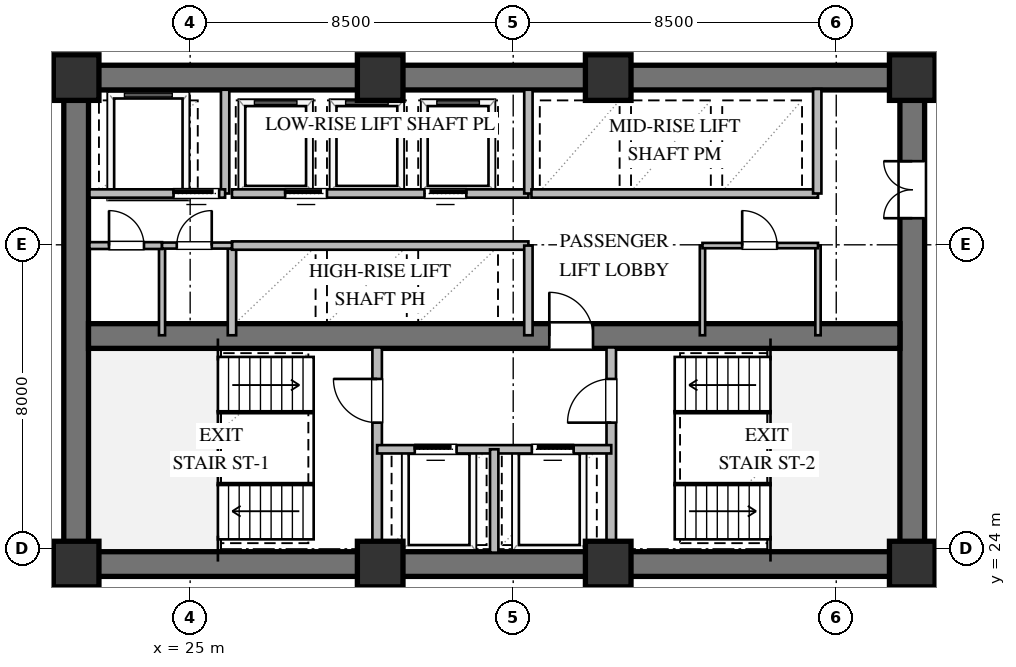
"""IFC4 building model, lengths in metres.
Left out: names, types, materials, properties, quantities, classifications, styles, units other than length and angle.
Written with IfcOpenShell. Run it as: python <this file> out.ifc"""

import sys

from ifc_helpers import new_model, si_unit, direction, frame, frame_2d, origin, origin_2d, place, context, subcontext, project, spatial, rectangle, extrude, element, fill, save


model = new_model("IFC4")
c1 = context("Model", 3, precision=1e-05, world=origin(), true_north=direction((0.0, 1.0)))
c2 = subcontext(c1, "Body", "Model", "MODEL_VIEW")
j1 = project(units=[si_unit("LENGTHUNIT", "METRE"), si_unit("PLANEANGLEUNIT", "RADIAN")], contexts=[c1])
p1 = place(None, origin())
s1 = spatial("IfcSite", under=j1, at=p1, CompositionType="ELEMENT")
p2 = place(p1, origin())
s2 = spatial("IfcBuilding", under=s1, at=p2, CompositionType="ELEMENT")
p3 = place(p2, frame((0.0, 0.0, 81.6)))
s3 = spatial("IfcBuildingStorey", under=s2, at=p3, CompositionType="ELEMENT", Elevation=81.6)
for number, where, z_axis, x_axis in (
    (1, (21.675, 23.6, 0.0), (0.0, 0.0, 1.0), (1.0, 0.0, 0.0)),
    (2, (21.675, 36.4, 0.0), (0.0, 0.0, 1.0), (1.0, 0.0, 0.0)),
):
    element("IfcWall", number, at=place(p3, frame(where, z_axis=z_axis, x_axis=x_axis)), inside=s3, PredefinedType="SHEAR", context=c2, shape_type="SweptSolid", body=[
        extrude(rectangle(XDim=22.65, YDim=0.65, at=frame_2d((11.325, 0.0))), origin(), (0.0, 0.0, 1.0), 3.36),
    ])
p4 = place(p3, frame((22.0, 23.925, 0.0), z_axis=(0.0, 0.0, 1.0), x_axis=(0.0, 1.0, 0.0)))
e3 = element("IfcWall", 3, at=p4, inside=s3, PredefinedType="SHEAR", context=c2, shape_type="SweptSolid", body=[
    extrude(rectangle(XDim=12.15, YDim=0.65, at=frame_2d((6.075, 0.0))), origin(), (0.0, 0.0, 1.0), 3.36),
])
p5 = place(p3, frame((44.0, 23.925, 0.0), z_axis=(0.0, 0.0, 1.0), x_axis=(0.0, 1.0, 0.0)))
e4 = element("IfcWall", 4, at=p5, inside=s3, PredefinedType="SHEAR", context=c2, shape_type="SweptSolid", body=[
    extrude(rectangle(XDim=12.15, YDim=0.65, at=frame_2d((6.075, 0.0))), origin(), (0.0, 0.0, 1.0), 3.36),
])
p6 = place(p5, frame((8.775, 0.0, 0.0)))
e5 = element("IfcOpeningElement", 5, at=p6, cuts=e4, PredefinedType="OPENING", context=c2, shape_type="SweptSolid", body=[
    extrude(rectangle(XDim=1.5, YDim=2.15, at=frame_2d((0.75, 1.075))), frame((0.0, 0.335, 0.0), z_axis=(0.0, -1.0, 0.0), x_axis=(1.0, 0.0, 0.0)), (0.0, 0.0, 1.0), 0.67),
])
p7 = place(p3, frame((22.325, 29.6, 0.0), z_axis=(0.0, 0.0, 1.0), x_axis=(1.0, 0.0, 0.0)))
e6 = element("IfcWall", 6, at=p7, inside=s3, PredefinedType="SHEAR", context=c2, shape_type="SweptSolid", body=[
    extrude(rectangle(XDim=21.35, YDim=0.65, at=frame_2d((10.675, 0.0))), origin(), (0.0, 0.0, 1.0), 3.36),
])
p8 = place(p7, frame((12.125, 0.0, 0.0)))
e7 = element("IfcOpeningElement", 7, at=p8, cuts=e6, PredefinedType="OPENING", context=c2, shape_type="SweptSolid", body=[
    extrude(rectangle(XDim=1.15, YDim=2.1, at=frame_2d((0.575, 1.05))), frame((0.0, 0.335, 0.0), z_axis=(0.0, -1.0, 0.0), x_axis=(1.0, 0.0, 0.0)), (0.0, 0.0, 1.0), 0.67),
])
for number, where, z_axis, x_axis in (
    (8, (22.0, 23.6, 0.0), (0.0, 0.0, 1.0), (1.0, 0.0, 0.0)),
    (9, (30.0, 23.6, 0.0), (0.0, 0.0, 1.0), (1.0, 0.0, 0.0)),
    (10, (36.0, 23.6, 0.0), (0.0, 0.0, 1.0), (1.0, 0.0, 0.0)),
    (11, (44.0, 23.6, 0.0), (0.0, 0.0, 1.0), (1.0, 0.0, 0.0)),
    (12, (44.0, 36.4, 0.0), (0.0, 0.0, 1.0), (1.0, 0.0, 0.0)),
    (13, (36.0, 36.4, 0.0), (0.0, 0.0, 1.0), (1.0, 0.0, 0.0)),
    (14, (30.0, 36.4, 0.0), (0.0, 0.0, 1.0), (1.0, 0.0, 0.0)),
    (15, (22.0, 36.4, 0.0), (0.0, 0.0, 1.0), (1.0, 0.0, 0.0)),
):
    element("IfcColumn", number, at=place(p3, frame(where, z_axis=z_axis, x_axis=x_axis)), inside=s3, PredefinedType="COLUMN", context=c2, shape_type="SweptSolid", body=[
        extrude(rectangle(XDim=1.2, YDim=1.2, at=origin_2d()), origin(), (0.0, 0.0, 1.0), 3.6),
    ])
p9 = place(p3, frame((29.92, 23.9, 0.0), z_axis=(0.0, 0.0, 1.0), x_axis=(0.0, 1.0, 0.0)))
e16 = element("IfcWall", 16, at=p9, inside=s3, PredefinedType="SOLIDWALL", context=c2, shape_type="SweptSolid", body=[
    extrude(rectangle(XDim=5.4, YDim=0.25, at=frame_2d((2.7, 0.0))), origin(), (0.0, 0.0, 1.0), 3.36),
])
p10 = place(p9, frame((3.421, 0.0, 0.0)))
e17 = element("IfcOpeningElement", 17, at=p10, cuts=e16, PredefinedType="OPENING", context=c2, shape_type="SweptSolid", body=[
    extrude(rectangle(XDim=1.15, YDim=2.1, at=frame_2d((0.575, 1.05))), frame((0.0, 0.135, 0.0), z_axis=(0.0, -1.0, 0.0), x_axis=(1.0, 0.0, 0.0)), (0.0, 0.0, 1.0), 0.27),
])
p11 = place(p3, frame((36.08, 23.9, 0.0), z_axis=(0.0, 0.0, 1.0), x_axis=(0.0, 1.0, 0.0)))
e18 = element("IfcWall", 18, at=p11, inside=s3, PredefinedType="SOLIDWALL", context=c2, shape_type="SweptSolid", body=[
    extrude(rectangle(XDim=5.4, YDim=0.25, at=frame_2d((2.7, 0.0))), origin(), (0.0, 0.0, 1.0), 3.36),
])
p12 = place(p11, frame((3.421, 0.0, 0.0)))
e19 = element("IfcOpeningElement", 19, at=p12, cuts=e18, PredefinedType="OPENING", context=c2, shape_type="SweptSolid", body=[
    extrude(rectangle(XDim=1.15, YDim=2.1, at=frame_2d((0.575, 1.05))), frame((0.0, 0.135, 0.0), z_axis=(0.0, -1.0, 0.0), x_axis=(1.0, 0.0, 0.0)), (0.0, 0.0, 1.0), 0.27),
])
p13 = place(p3, frame((29.92, 26.62, 0.0), z_axis=(0.0, 0.0, 1.0), x_axis=(1.0, 0.0, 0.0)))
e20 = element("IfcWall", 20, at=p13, inside=s3, PredefinedType="SOLIDWALL", context=c2, shape_type="SweptSolid", body=[
    extrude(rectangle(XDim=6.16, YDim=0.22, at=frame_2d((3.08, 0.0))), origin(), (0.0, 0.0, 1.0), 3.36),
])
p14 = place(p13, frame((0.99, 0.0, 0.0)))
e21 = element("IfcOpeningElement", 21, at=p14, cuts=e20, PredefinedType="OPENING", context=c2, shape_type="SweptSolid", body=[
    extrude(rectangle(XDim=1.1, YDim=2.1, at=frame_2d((0.55, 1.05))), frame((0.0, 0.12, 0.0), z_axis=(0.0, -1.0, 0.0), x_axis=(1.0, 0.0, 0.0)), (0.0, 0.0, 1.0), 0.24),
])
p15 = place(p13, frame((4.07, 0.0, 0.0)))
e22 = element("IfcOpeningElement", 22, at=p15, cuts=e20, PredefinedType="OPENING", context=c2, shape_type="SweptSolid", body=[
    extrude(rectangle(XDim=1.1, YDim=2.1, at=frame_2d((0.55, 1.05))), frame((0.0, 0.12, 0.0), z_axis=(0.0, -1.0, 0.0), x_axis=(1.0, 0.0, 0.0)), (0.0, 0.0, 1.0), 0.24),
])
p16 = place(p3, frame((33.0, 23.9, 0.0), z_axis=(0.0, 0.0, 1.0), x_axis=(0.0, 1.0, 0.0)))
e23 = element("IfcWall", 23, at=p16, inside=s3, PredefinedType="SOLIDWALL", context=c2, shape_type="SweptSolid", body=[
    extrude(rectangle(XDim=2.72, YDim=0.22, at=frame_2d((1.36, 0.0))), origin(), (0.0, 0.0, 1.0), 3.36),
])
p17 = place(p3, frame((25.92, 33.35, 0.0), z_axis=(0.0, 0.0, 1.0), x_axis=(0.0, 1.0, 0.0)))
e24 = element("IfcWall", 24, at=p17, inside=s3, PredefinedType="SOLIDWALL", context=c2, shape_type="SweptSolid", body=[
    extrude(rectangle(XDim=2.73, YDim=0.22, at=frame_2d((1.365, 0.0))), origin(), (0.0, 0.0, 1.0), 3.36),
])
p18 = place(p3, frame((22.35, 33.35, 0.0), z_axis=(0.0, 0.0, 1.0), x_axis=(1.0, 0.0, 0.0)))
e25 = element("IfcWall", 25, at=p18, inside=s3, PredefinedType="SOLIDWALL", context=c2, shape_type="SweptSolid", body=[
    extrude(rectangle(XDim=3.57, YDim=0.22, at=frame_2d((1.785, 0.0))), origin(), (0.0, 0.0, 1.0), 3.36),
])
p19 = place(p18, frame((2.213, 0.0, 0.0)))
e26 = element("IfcOpeningElement", 26, at=p19, cuts=e25, PredefinedType="OPENING", context=c2, shape_type="SweptSolid", body=[
    extrude(rectangle(XDim=1.2, YDim=2.1, at=frame_2d((0.6, 1.05))), frame((0.0, 0.12, 0.0), z_axis=(0.0, -1.0, 0.0), x_axis=(1.0, 0.0, 0.0)), (0.0, 0.0, 1.0), 0.24),
])
p20 = place(p3, frame((26.1, 29.62, 0.0), z_axis=(0.0, 0.0, 1.0), x_axis=(0.0, 1.0, 0.0)))
e27 = element("IfcWall", 27, at=p20, inside=s3, PredefinedType="SOLIDWALL", context=c2, shape_type="SweptSolid", body=[
    extrude(rectangle(XDim=2.36, YDim=0.22, at=frame_2d((1.18, 0.0))), origin(), (0.0, 0.0, 1.0), 3.36),
])
p21 = place(p3, frame((26.1, 31.98, 0.0), z_axis=(0.0, 0.0, 1.0), x_axis=(1.0, 0.0, 0.0)))
e28 = element("IfcWall", 28, at=p21, inside=s3, PredefinedType="SOLIDWALL", context=c2, shape_type="SweptSolid", body=[
    extrude(rectangle(XDim=7.8, YDim=0.22, at=frame_2d((3.9, 0.0))), origin(), (0.0, 0.0, 1.0), 3.36),
])
p22 = place(p3, frame((33.9, 29.62, 0.0), z_axis=(0.0, 0.0, 1.0), x_axis=(0.0, 1.0, 0.0)))
e29 = element("IfcWall", 29, at=p22, inside=s3, PredefinedType="SOLIDWALL", context=c2, shape_type="SweptSolid", body=[
    extrude(rectangle(XDim=2.36, YDim=0.22, at=frame_2d((1.18, 0.0))), origin(), (0.0, 0.0, 1.0), 3.36),
])
p23 = place(p3, frame((26.1, 33.35, 0.0), z_axis=(0.0, 0.0, 1.0), x_axis=(1.0, 0.0, 0.0)))
e30 = element("IfcWall", 30, at=p23, inside=s3, PredefinedType="SOLIDWALL", context=c2, shape_type="SweptSolid", body=[
    extrude(rectangle(XDim=7.8, YDim=0.22, at=frame_2d((3.9, 0.0))), origin(), (0.0, 0.0, 1.0), 3.36),
])
p24 = place(p23, frame((1.4, 0.0, 0.0)))
e31 = element("IfcOpeningElement", 31, at=p24, cuts=e30, PredefinedType="OPENING", context=c2, shape_type="SweptSolid", body=[
    extrude(rectangle(XDim=1.1, YDim=2.1, at=frame_2d((0.55, 1.05))), frame((0.0, 0.12, 0.0), z_axis=(0.0, -1.0, 0.0), x_axis=(1.0, 0.0, 0.0)), (0.0, 0.0, 1.0), 0.24),
])
p25 = place(p23, frame((5.066, 0.0, 0.0)))
e32 = element("IfcOpeningElement", 32, at=p25, cuts=e30, PredefinedType="OPENING", context=c2, shape_type="SweptSolid", body=[
    extrude(rectangle(XDim=1.1, YDim=2.1, at=frame_2d((0.55, 1.05))), frame((0.0, 0.12, 0.0), z_axis=(0.0, -1.0, 0.0), x_axis=(1.0, 0.0, 0.0)), (0.0, 0.0, 1.0), 0.24),
])
p26 = place(p3, frame((33.9, 33.35, 0.0), z_axis=(0.0, 0.0, 1.0), x_axis=(0.0, 1.0, 0.0)))
e33 = element("IfcWall", 33, at=p26, inside=s3, PredefinedType="SOLIDWALL", context=c2, shape_type="SweptSolid", body=[
    extrude(rectangle(XDim=2.73, YDim=0.22, at=frame_2d((1.365, 0.0))), origin(), (0.0, 0.0, 1.0), 3.36),
])
p27 = place(p3, frame((33.98, 33.35, 0.0), z_axis=(0.0, 0.0, 1.0), x_axis=(1.0, 0.0, 0.0)))
e34 = element("IfcWall", 34, at=p27, inside=s3, PredefinedType="SOLIDWALL", context=c2, shape_type="SweptSolid", body=[
    extrude(rectangle(XDim=7.54, YDim=0.22, at=frame_2d((3.77, 0.0))), origin(), (0.0, 0.0, 1.0), 3.36),
])
p28 = place(p3, frame((41.5, 33.35, 0.0), z_axis=(0.0, 0.0, 1.0), x_axis=(0.0, 1.0, 0.0)))
e35 = element("IfcWall", 35, at=p28, inside=s3, PredefinedType="SOLIDWALL", context=c2, shape_type="SweptSolid", body=[
    extrude(rectangle(XDim=2.75, YDim=0.22, at=frame_2d((1.375, 0.0))), origin(), (0.0, 0.0, 1.0), 3.36),
])
p29 = place(p3, frame((24.26, 29.62, 0.0), z_axis=(0.0, 0.0, 1.0), x_axis=(0.0, 1.0, 0.0)))
e36 = element("IfcWall", 36, at=p29, inside=s3, PredefinedType="PLUMBINGWALL", context=c2, shape_type="SweptSolid", body=[
    extrude(rectangle(XDim=2.36, YDim=0.16, at=frame_2d((1.18, 0.0))), origin(), (0.0, 0.0, 1.0), 3.36),
])
p30 = place(p3, frame((22.35, 31.98, 0.0), z_axis=(0.0, 0.0, 1.0), x_axis=(1.0, 0.0, 0.0)))
e37 = element("IfcWall", 37, at=p30, inside=s3, PredefinedType="PARTITIONING", context=c2, shape_type="SweptSolid", body=[
    extrude(rectangle(XDim=1.91, YDim=0.18, at=frame_2d((0.955, 0.0))), origin(), (0.0, 0.0, 1.0), 3.36),
])
p31 = place(p30, frame((0.515, 0.0, 0.0)))
e38 = element("IfcOpeningElement", 38, at=p31, cuts=e37, PredefinedType="OPENING", context=c2, shape_type="SweptSolid", body=[
    extrude(rectangle(XDim=0.92, YDim=2.1, at=frame_2d((0.46, 1.05))), frame((0.0, 0.1, 0.0), z_axis=(0.0, -1.0, 0.0), x_axis=(1.0, 0.0, 0.0)), (0.0, 0.0, 1.0), 0.2),
])
p32 = place(p3, frame((24.26, 31.98, 0.0), z_axis=(0.0, 0.0, 1.0), x_axis=(1.0, 0.0, 0.0)))
e39 = element("IfcWall", 39, at=p32, inside=s3, PredefinedType="PLUMBINGWALL", context=c2, shape_type="SweptSolid", body=[
    extrude(rectangle(XDim=1.84, YDim=0.16, at=frame_2d((0.92, 0.0))), origin(), (0.0, 0.0, 1.0), 3.36),
])
p33 = place(p32, frame((0.388, 0.0, 0.0)))
e40 = element("IfcOpeningElement", 40, at=p33, cuts=e39, PredefinedType="OPENING", context=c2, shape_type="SweptSolid", body=[
    extrude(rectangle(XDim=0.92, YDim=2.1, at=frame_2d((0.46, 1.05))), frame((0.0, 0.09, 0.0), z_axis=(0.0, -1.0, 0.0), x_axis=(1.0, 0.0, 0.0)), (0.0, 0.0, 1.0), 0.18),
])
for number, where, z_axis, x_axis in (
    (41, (38.48, 29.62, 0.0), (0.0, 0.0, 1.0), (0.0, 1.0, 0.0)),
    (42, (41.52, 29.62, 0.0), (0.0, 0.0, 1.0), (0.0, 1.0, 0.0)),
):
    element("IfcWall", number, at=place(p3, frame(where, z_axis=z_axis, x_axis=x_axis)), inside=s3, PredefinedType="PARTITIONING", context=c2, shape_type="SweptSolid", body=[
        extrude(rectangle(XDim=2.36, YDim=0.14, at=frame_2d((1.18, 0.0))), origin(), (0.0, 0.0, 1.0), 3.36),
    ])
p34 = place(p3, frame((38.48, 31.98, 0.0), z_axis=(0.0, 0.0, 1.0), x_axis=(1.0, 0.0, 0.0)))
e43 = element("IfcWall", 43, at=p34, inside=s3, PredefinedType="PARTITIONING", context=c2, shape_type="SweptSolid", body=[
    extrude(rectangle(XDim=3.04, YDim=0.14, at=frame_2d((1.52, 0.0))), origin(), (0.0, 0.0, 1.0), 3.36),
])
p35 = place(p34, frame((1.045, 0.0, 0.0)))
e44 = element("IfcOpeningElement", 44, at=p35, cuts=e43, PredefinedType="OPENING", context=c2, shape_type="SweptSolid", body=[
    extrude(rectangle(XDim=0.92, YDim=2.1, at=frame_2d((0.46, 1.05))), frame((0.0, 0.08, 0.0), z_axis=(0.0, -1.0, 0.0), x_axis=(1.0, 0.0, 0.0)), (0.0, 0.0, 1.0), 0.16),
])
p36 = place(p10, origin())
e45 = element("IfcDoor", 45, at=p36, inside=s3, OperationType="SINGLE_SWING_RIGHT", PredefinedType="DOOR", context=c2, shape_type="SweptSolid", body=[
    extrude(rectangle(XDim=1.15, YDim=2.1, at=frame_2d((0.575, 1.05))), frame((0.0, 0.025, 0.0), z_axis=(0.0, -1.0, 0.0), x_axis=(1.0, 0.0, 0.0)), (0.0, 0.0, 1.0), 0.05),
])
fill(e17, e45)
p37 = place(p12, origin())
e46 = element("IfcDoor", 46, at=p37, inside=s3, OperationType="SINGLE_SWING_LEFT", PredefinedType="DOOR", context=c2, shape_type="SweptSolid", body=[
    extrude(rectangle(XDim=1.15, YDim=2.1, at=frame_2d((0.575, 1.05))), frame((0.0, 0.025, 0.0), z_axis=(0.0, -1.0, 0.0), x_axis=(1.0, 0.0, 0.0)), (0.0, 0.0, 1.0), 0.05),
])
fill(e19, e46)
p38 = place(p14, origin())
e47 = element("IfcDoor", 47, at=p38, inside=s3, OperationType="SLIDING_TO_LEFT", PredefinedType="DOOR", context=c2, shape_type="SweptSolid", body=[
    extrude(rectangle(XDim=1.1, YDim=2.1, at=frame_2d((0.55, 1.05))), frame((0.0, 0.025, 0.0), z_axis=(0.0, -1.0, 0.0), x_axis=(1.0, 0.0, 0.0)), (0.0, 0.0, 1.0), 0.05),
])
fill(e21, e47)
p39 = place(p15, origin())
e48 = element("IfcDoor", 48, at=p39, inside=s3, OperationType="SLIDING_TO_RIGHT", PredefinedType="DOOR", context=c2, shape_type="SweptSolid", body=[
    extrude(rectangle(XDim=1.1, YDim=2.1, at=frame_2d((0.55, 1.05))), frame((0.0, 0.025, 0.0), z_axis=(0.0, -1.0, 0.0), x_axis=(1.0, 0.0, 0.0)), (0.0, 0.0, 1.0), 0.05),
])
fill(e22, e48)
p40 = place(p8, origin())
e49 = element("IfcDoor", 49, at=p40, inside=s3, OperationType="SINGLE_SWING_LEFT", PredefinedType="DOOR", context=c2, shape_type="SweptSolid", body=[
    extrude(rectangle(XDim=1.15, YDim=2.1, at=frame_2d((0.575, 1.05))), frame((0.0, 0.025, 0.0), z_axis=(0.0, -1.0, 0.0), x_axis=(1.0, 0.0, 0.0)), (0.0, 0.0, 1.0), 0.05),
])
fill(e7, e49)
p41 = place(p6, origin())
e50 = element("IfcDoor", 50, at=p41, inside=s3, OperationType="DOUBLE_DOOR_SINGLE_SWING", PredefinedType="DOOR", context=c2, shape_type="SweptSolid", body=[
    extrude(rectangle(XDim=1.5, YDim=2.15, at=frame_2d((0.75, 1.075))), frame((0.0, 0.025, 0.0), z_axis=(0.0, -1.0, 0.0), x_axis=(1.0, 0.0, 0.0)), (0.0, 0.0, 1.0), 0.05),
])
fill(e5, e50)
p42 = place(p19, origin())
e51 = element("IfcDoor", 51, at=p42, inside=s3, OperationType="SLIDING_TO_LEFT", PredefinedType="DOOR", context=c2, shape_type="SweptSolid", body=[
    extrude(rectangle(XDim=1.2, YDim=2.1, at=frame_2d((0.6, 1.05))), frame((0.0, 0.025, 0.0), z_axis=(0.0, -1.0, 0.0), x_axis=(1.0, 0.0, 0.0)), (0.0, 0.0, 1.0), 0.05),
])
fill(e26, e51)
p43 = place(p24, origin())
e52 = element("IfcDoor", 52, at=p43, inside=s3, OperationType="SLIDING_TO_LEFT", PredefinedType="DOOR", context=c2, shape_type="SweptSolid", body=[
    extrude(rectangle(XDim=1.1, YDim=2.1, at=frame_2d((0.55, 1.05))), frame((0.0, 0.025, 0.0), z_axis=(0.0, -1.0, 0.0), x_axis=(1.0, 0.0, 0.0)), (0.0, 0.0, 1.0), 0.05),
])
fill(e31, e52)
p44 = place(p25, origin())
e53 = element("IfcDoor", 53, at=p44, inside=s3, OperationType="SLIDING_TO_RIGHT", PredefinedType="DOOR", context=c2, shape_type="SweptSolid", body=[
    extrude(rectangle(XDim=1.1, YDim=2.1, at=frame_2d((0.55, 1.05))), frame((0.0, 0.025, 0.0), z_axis=(0.0, -1.0, 0.0), x_axis=(1.0, 0.0, 0.0)), (0.0, 0.0, 1.0), 0.05),
])
fill(e32, e53)
p45 = place(p31, origin())
e54 = element("IfcDoor", 54, at=p45, inside=s3, OperationType="SINGLE_SWING_LEFT", PredefinedType="DOOR", context=c2, shape_type="SweptSolid", body=[
    extrude(rectangle(XDim=0.92, YDim=2.1, at=frame_2d((0.46, 1.05))), frame((0.0, 0.025, 0.0), z_axis=(0.0, -1.0, 0.0), x_axis=(1.0, 0.0, 0.0)), (0.0, 0.0, 1.0), 0.05),
])
fill(e38, e54)
p46 = place(p33, origin())
e55 = element("IfcDoor", 55, at=p46, inside=s3, OperationType="SINGLE_SWING_RIGHT", PredefinedType="DOOR", context=c2, shape_type="SweptSolid", body=[
    extrude(rectangle(XDim=0.92, YDim=2.1, at=frame_2d((0.46, 1.05))), frame((0.0, 0.025, 0.0), z_axis=(0.0, -1.0, 0.0), x_axis=(1.0, 0.0, 0.0)), (0.0, 0.0, 1.0), 0.05),
])
fill(e40, e55)
p47 = place(p35, origin())
e56 = element("IfcDoor", 56, at=p47, inside=s3, OperationType="SINGLE_SWING_LEFT", PredefinedType="DOOR", context=c2, shape_type="SweptSolid", body=[
    extrude(rectangle(XDim=0.92, YDim=2.1, at=frame_2d((0.46, 1.05))), frame((0.0, 0.025, 0.0), z_axis=(0.0, -1.0, 0.0), x_axis=(1.0, 0.0, 0.0)), (0.0, 0.0, 1.0), 0.05),
])
fill(e44, e56)
save(model, sys.argv[1])
